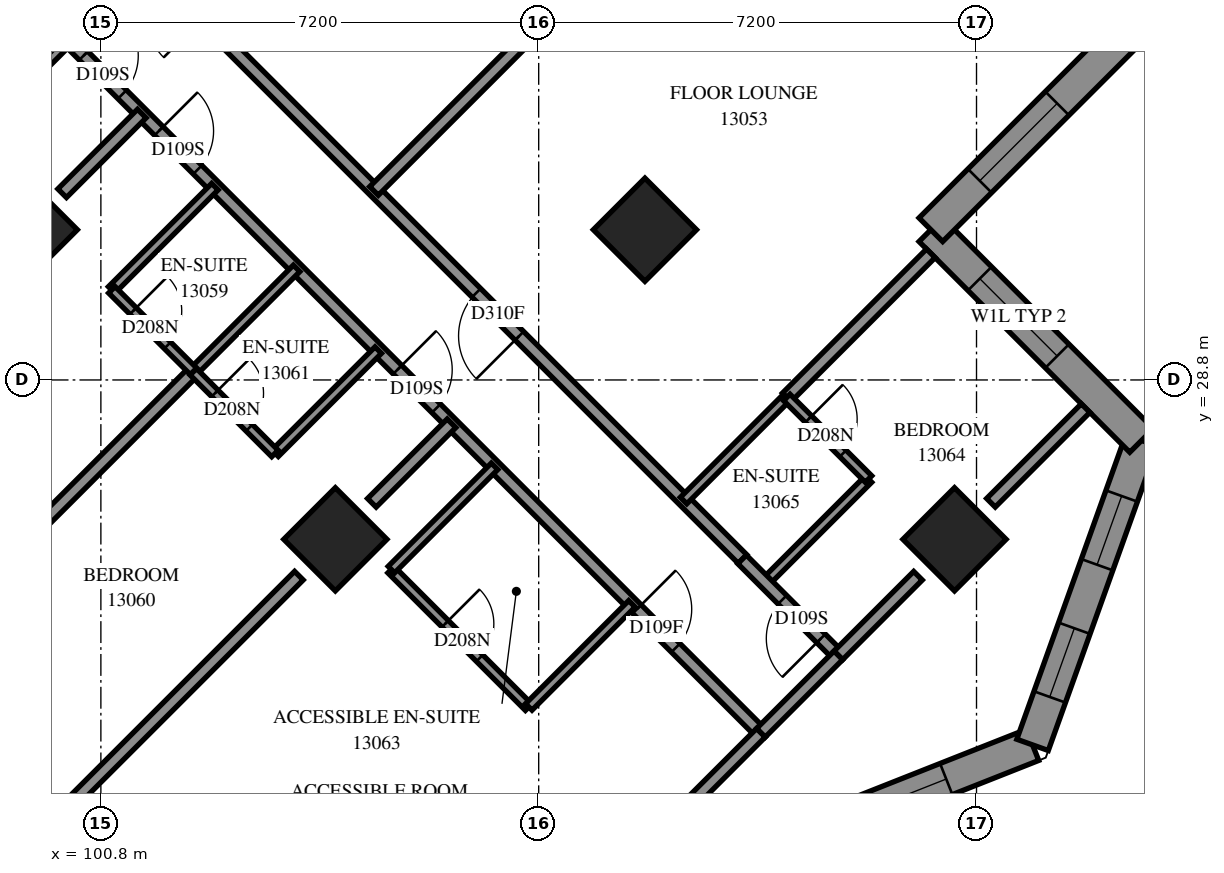
"""IFC4 building model, lengths in metres.
Left out: names, types, materials, properties, quantities, classifications, styles, units other than length and angle.
Written with IfcOpenShell. Run it as: python <this file> out.ifc"""

import sys

from ifc_helpers import new_model, si_unit, direction, frame, frame_2d, origin, origin_2d, place, context, subcontext, project, spatial, polyline, rectangle, outline, extrude, element, fill, save


model = new_model("IFC4")
c1 = context("Model", 3, precision=1e-05, world=origin(), true_north=direction((0.0, 1.0)))
c2 = subcontext(c1, "Body", "Model", "MODEL_VIEW")
j1 = project(units=[si_unit("LENGTHUNIT", "METRE"), si_unit("PLANEANGLEUNIT", "RADIAN")], contexts=[c1])
p1 = place(None, origin())
s1 = spatial("IfcSite", under=j1, at=p1, CompositionType="ELEMENT")
p2 = place(p1, origin())
s2 = spatial("IfcBuilding", under=s1, at=p2, CompositionType="ELEMENT")
p3 = place(p2, frame((0.0, 0.0, 50.8)))
s3 = spatial("IfcBuildingStorey", under=s2, at=p3, CompositionType="ELEMENT", Elevation=50.8)
for number, where, z_axis, x_axis in (
    (1, (99.565, 31.271, 0.0), (0.0, 0.0, 1.0), (0.707, -0.707, 0.0)),
    (2, (109.747, 31.271, 0.0), (0.0, 0.0, 1.0), (0.707, -0.707, 0.0)),
    (3, (104.656, 26.18, 0.0), (0.0, 0.0, 1.0), (0.707, -0.707, 0.0)),
    (4, (114.838, 26.18, 0.0), (0.0, 0.0, 1.0), (0.707, -0.707, 0.0)),
):
    element("IfcColumn", number, at=place(p3, frame(where, z_axis=z_axis, x_axis=x_axis)), inside=s3, PredefinedType="COLUMN", context=c2, shape_type="SweptSolid", body=[
        extrude(rectangle(XDim=1.2, YDim=1.2, at=origin_2d()), origin(), (0.0, 0.0, 1.0), 3.1),
    ])
p4 = place(p3, frame((110.98, 20.766, 0.0), z_axis=(0.0, 0.0, 1.0), x_axis=(0.9299302272, 0.3677360094, 0.0)))
e5 = element("IfcWall", 5, at=p4, inside=s3, PredefinedType="SOLIDWALL", context=c2, shape_type="SweptSolid", body=[
    extrude(outline(polyline([(0.119, -0.275), (5.653, -0.275), (5.404, 0.275), (-0.119, 0.275), (0.119, -0.275)])), origin(), (0.0, 0.0, 1.0), 3.1),
])
p5 = place(p4, frame((1.202, 0.0, 0.5)))
e6 = element("IfcOpeningElement", 6, at=p5, cuts=e5, PredefinedType="OPENING", context=c2, shape_type="SweptSolid", body=[
    extrude(rectangle(XDim=2.8, YDim=2.45, at=frame_2d((1.4, 1.225))), frame((0.0, 0.285, 0.0), z_axis=(0.0, -1.0, 0.0), x_axis=(1.0, 0.0, 0.0)), (0.0, 0.0, 1.0), 0.57),
])
p6 = place(p3, frame((116.122, 22.799, 0.0), z_axis=(0.0, 0.0, 1.0), x_axis=(0.3371641743, 0.9414458665, 0.0)))
e7 = element("IfcWall", 7, at=p6, inside=s3, PredefinedType="SOLIDWALL", context=c2, shape_type="SweptSolid", body=[
    extrude(outline(polyline([(-0.124, -0.275), (5.492, -0.275), (5.144, 0.275), (0.124, 0.275), (-0.124, -0.275)])), origin(), (0.0, 0.0, 1.0), 3.1),
])
p7 = place(p6, frame((0.838, 0.0, 0.5)))
e8 = element("IfcOpeningElement", 8, at=p7, cuts=e7, PredefinedType="OPENING", context=c2, shape_type="SweptSolid", body=[
    extrude(rectangle(XDim=1.2, YDim=2.45, at=frame_2d((0.6, 1.225))), frame((0.0, 0.285, 0.0), z_axis=(0.0, -1.0, 0.0), x_axis=(1.0, 0.0, 0.0)), (0.0, 0.0, 1.0), 0.57),
])
p8 = place(p6, frame((3.147, 0.0, 0.5)))
e9 = element("IfcOpeningElement", 9, at=p8, cuts=e7, PredefinedType="OPENING", context=c2, shape_type="SweptSolid", body=[
    extrude(rectangle(XDim=1.2, YDim=2.45, at=frame_2d((0.6, 1.225))), frame((0.0, 0.285, 0.0), z_axis=(0.0, -1.0, 0.0), x_axis=(1.0, 0.0, 0.0)), (0.0, 0.0, 1.0), 0.57),
])
p9 = place(p3, frame((117.915, 27.805, 0.0), z_axis=(0.0, 0.0, 1.0), x_axis=(-0.7071067812, 0.7071067812, 0.0)))
e10 = element("IfcWall", 10, at=p9, inside=s3, PredefinedType="SOLIDWALL", context=c2, shape_type="SweptSolid", body=[
    extrude(outline(polyline([(-0.174, -0.275), (4.626, -0.275), (5.176, 0.275), (0.174, 0.275), (-0.174, -0.275)])), origin(), (0.0, 0.0, 1.0), 3.1),
])
p10 = place(p9, frame((1.963, 0.0, 0.6)))
e11 = element("IfcOpeningElement", 11, at=p10, cuts=e10, PredefinedType="OPENING", context=c2, shape_type="SweptSolid", body=[
    extrude(rectangle(XDim=1.8, YDim=1.9, at=frame_2d((0.9, 0.95))), frame((0.0, 0.285, 0.0), z_axis=(0.0, -1.0, 0.0), x_axis=(1.0, 0.0, 0.0)), (0.0, 0.0, 1.0), 0.57),
])
p11 = place(p3, frame((114.449, 31.271, 0.0), z_axis=(0.0, 0.0, 1.0), x_axis=(0.7070981737, 0.7071153885, 0.0)))
e12 = element("IfcWall", 12, at=p11, inside=s3, PredefinedType="SOLIDWALL", context=c2, shape_type="SweptSolid", body=[
    extrude(outline(polyline([(0.275, -0.275), (6.187, -0.275), (5.431, 0.275), (-0.275, 0.275), (0.275, -0.275)])), origin(), (0.0, 0.0, 1.0), 3.1),
])
p12 = place(p11, frame((1.137, 0.0, 0.6)))
e13 = element("IfcOpeningElement", 13, at=p12, cuts=e12, PredefinedType="OPENING", context=c2, shape_type="SweptSolid", body=[
    extrude(rectangle(XDim=1.8, YDim=1.9, at=frame_2d((0.9, 0.95))), frame((0.0, 0.285, 0.0), z_axis=(0.0, -1.0, 0.0), x_axis=(1.0, 0.0, 0.0)), (0.0, 0.0, 1.0), 0.57),
])
p13 = place(p3, frame((93.481, 41.167, 0.0), z_axis=(0.0, 0.0, 1.0), x_axis=(0.7071067812, -0.7071067812, 0.0)))
e14 = element("IfcWall", 14, at=p13, inside=s3, PredefinedType="PARTITIONING", context=c2, shape_type="SweptSolid", body=[
    extrude(rectangle(XDim=25.699, YDim=0.2, at=frame_2d((12.85, 0.0))), origin(), (0.0, 0.0, 1.0), 3.1),
])
p14 = place(p13, frame((2.8, 0.0, 0.0)))
e15 = element("IfcOpeningElement", 15, at=p14, cuts=e14, PredefinedType="OPENING", context=c2, shape_type="SweptSolid", body=[
    extrude(rectangle(XDim=0.9, YDim=2.1, at=frame_2d((0.45, 1.05))), frame((0.0, 0.11, 0.0), z_axis=(0.0, -1.0, 0.0), x_axis=(1.0, 0.0, 0.0)), (0.0, 0.0, 1.0), 0.22),
])
p15 = place(p13, frame((9.948, 0.0, 0.0)))
e16 = element("IfcOpeningElement", 16, at=p15, cuts=e14, PredefinedType="OPENING", context=c2, shape_type="SweptSolid", body=[
    extrude(rectangle(XDim=0.9, YDim=2.1, at=frame_2d((0.45, 1.05))), frame((0.0, 0.11, 0.0), z_axis=(0.0, -1.0, 0.0), x_axis=(1.0, 0.0, 0.0)), (0.0, 0.0, 1.0), 0.22),
])
p16 = place(p13, frame((11.7, 0.0, 0.0)))
e17 = element("IfcOpeningElement", 17, at=p16, cuts=e14, PredefinedType="OPENING", context=c2, shape_type="SweptSolid", body=[
    extrude(rectangle(XDim=0.9, YDim=2.1, at=frame_2d((0.45, 1.05))), frame((0.0, 0.11, 0.0), z_axis=(0.0, -1.0, 0.0), x_axis=(1.0, 0.0, 0.0)), (0.0, 0.0, 1.0), 0.22),
])
p17 = place(p13, frame((17.25, 0.0, 0.0)))
e18 = element("IfcOpeningElement", 18, at=p17, cuts=e14, PredefinedType="OPENING", context=c2, shape_type="SweptSolid", body=[
    extrude(rectangle(XDim=0.9, YDim=2.1, at=frame_2d((0.45, 1.05))), frame((0.0, 0.11, 0.0), z_axis=(0.0, -1.0, 0.0), x_axis=(1.0, 0.0, 0.0)), (0.0, 0.0, 1.0), 0.22),
])
p18 = place(p13, frame((22.82, 0.0, 0.0)))
e19 = element("IfcOpeningElement", 19, at=p18, cuts=e14, PredefinedType="OPENING", context=c2, shape_type="SweptSolid", body=[
    extrude(rectangle(XDim=0.9, YDim=2.1, at=frame_2d((0.45, 1.05))), frame((0.0, 0.11, 0.0), z_axis=(0.0, -1.0, 0.0), x_axis=(1.0, 0.0, 0.0)), (0.0, 0.0, 1.0), 0.22),
])
p19 = place(p3, frame((111.352, 25.855, 0.0), z_axis=(0.0, 0.0, 1.0), x_axis=(-0.7070418597, 0.7071716967, 0.0)))
e20 = element("IfcWall", 20, at=p19, inside=s3, PredefinedType="PARTITIONING", context=c2, shape_type="SweptSolid", body=[
    extrude(rectangle(XDim=13.864, YDim=0.2, at=frame_2d((6.932, 0.0))), origin(), (0.0, 0.0, 1.0), 3.1),
])
p20 = place(p19, frame((12.564, 0.0, 0.0)))
e21 = element("IfcOpeningElement", 21, at=p20, cuts=e20, PredefinedType="OPENING", context=c2, shape_type="SweptSolid", body=[
    extrude(rectangle(XDim=0.9, YDim=2.1, at=frame_2d((0.45, 1.05))), frame((0.0, 0.11, 0.0), z_axis=(0.0, -1.0, 0.0), x_axis=(1.0, 0.0, 0.0)), (0.0, 0.0, 1.0), 0.22),
])
p21 = place(p19, frame((5.19, 0.0, 0.0)))
e22 = element("IfcOpeningElement", 22, at=p21, cuts=e20, PredefinedType="OPENING", context=c2, shape_type="SweptSolid", body=[
    extrude(rectangle(XDim=1.0, YDim=2.1, at=frame_2d((0.5, 1.05))), frame((0.0, 0.11, 0.0), z_axis=(0.0, -1.0, 0.0), x_axis=(1.0, 0.0, 0.0)), (0.0, 0.0, 1.0), 0.22),
])
p22 = place(p3, frame((105.292, 31.908, 0.0), z_axis=(0.0, 0.0, 1.0), x_axis=(0.7071022382, 0.7071113241, 0.0)))
e23 = element("IfcWall", 23, at=p22, inside=s3, PredefinedType="PARTITIONING", context=c2, shape_type="SweptSolid", body=[
    extrude(rectangle(XDim=11.006, YDim=0.2, at=frame_2d((5.503, 0.0))), origin(), (0.0, 0.0, 1.0), 3.1),
])
p23 = place(p3, frame((96.526, 23.142, 0.0), z_axis=(0.0, 0.0, 1.0), x_axis=(0.7071128801, 0.7071006822, 0.0)))
e24 = element("IfcWall", 24, at=p23, inside=s3, PredefinedType="PARTITIONING", context=c2, shape_type="SweptSolid", body=[
    extrude(rectangle(XDim=8.198, YDim=0.2, at=frame_2d((4.099, 0.0))), origin(), (0.0, 0.0, 1.0), 3.1),
])
p24 = place(p3, frame((100.162, 21.688, 0.0), z_axis=(0.0, 0.0, 1.0), x_axis=(0.7071067812, 0.7071067812, 0.0)))
e25 = element("IfcWall", 25, at=p24, inside=s3, PredefinedType="PARTITIONING", context=c2, shape_type="SweptSolid", body=[
    extrude(rectangle(XDim=5.507, YDim=0.2, at=frame_2d((2.753, 0.0))), origin(), (0.0, 0.0, 1.0), 3.1),
])
p25 = place(p3, frame((112.079, 28.513, 0.0), z_axis=(0.0, 0.0, 1.0), x_axis=(0.7071067812, 0.7071067812, 0.0)))
e26 = element("IfcWall", 26, at=p25, inside=s3, PredefinedType="PARTITIONING", context=c2, shape_type="SweptSolid", body=[
    extrude(rectangle(XDim=3.351, YDim=0.2, at=frame_2d((1.675, 0.0))), origin(), (0.0, 0.0, 1.0), 3.1),
])
p26 = place(p3, frame((105.573, 25.681, 0.0), z_axis=(0.0, 0.0, 1.0), x_axis=(0.7071067812, -0.7071067812, 0.0)))
e27 = element("IfcWall", 27, at=p26, inside=s3, PredefinedType="PARTITIONING", context=c2, shape_type="SweptSolid", body=[
    extrude(rectangle(XDim=3.199, YDim=0.15, at=frame_2d((1.599, 0.0))), origin(), (0.0, 0.0, 1.0), 3.1),
])
p27 = place(p26, frame((1.258, 0.0, 0.0)))
e28 = element("IfcOpeningElement", 28, at=p27, cuts=e27, PredefinedType="OPENING", context=c2, shape_type="SweptSolid", body=[
    extrude(rectangle(XDim=0.8, YDim=2.1, at=frame_2d((0.4, 1.05))), frame((0.0, 0.085, 0.0), z_axis=(0.0, -1.0, 0.0), x_axis=(1.0, 0.0, 0.0)), (0.0, 0.0, 1.0), 0.17),
])
for number, where, z_axis, x_axis in (
    (29, (100.977, 30.281, 0.0), (0.0, 0.0, 1.0), (0.707, 0.707, 0.0)),
    (30, (111.725, 25.473, 0.0), (0.0, 0.0, 1.0), (0.707, 0.707, 0.0)),
    (31, (98.573, 32.685, 0.0), (0.0, 0.0, 1.0), (0.707, 0.707, 0.0)),
):
    element("IfcWall", number, at=place(p3, frame(where, z_axis=z_axis, x_axis=x_axis)), inside=s3, PredefinedType="PARTITIONING", context=c2, shape_type="SweptSolid", body=[
        extrude(rectangle(XDim=2.401, YDim=0.15, at=frame_2d((1.201, 0.0))), origin(), (0.0, 0.0, 1.0), 3.1),
    ])
p28 = place(p3, frame((105.578, 25.682, 0.0), z_axis=(0.0, 0.0, 1.0), x_axis=(0.706689978, 0.7075233388, 0.0)))
e32 = element("IfcWall", 32, at=p28, inside=s3, PredefinedType="PARTITIONING", context=c2, shape_type="SweptSolid", body=[
    extrude(rectangle(XDim=2.4, YDim=0.15, at=frame_2d((1.2, 0.0))), origin(), (0.0, 0.0, 1.0), 3.1),
])
for number, where, z_axis, x_axis in (
    (33, (110.383, 26.817, 0.0), (0.0, 0.0, 1.0), (0.707, 0.707, 0.0)),
    (34, (102.323, 28.939, 0.0), (0.0, 0.0, 1.0), (0.707, 0.707, 0.0)),
    (35, (103.665, 27.595, 0.0), (0.0, 0.0, 1.0), (0.707, 0.707, 0.0)),
    (36, (107.837, 23.423, 0.0), (0.0, 0.0, 1.0), (0.707, 0.707, 0.0)),
):
    element("IfcWall", number, at=place(p3, frame(where, z_axis=z_axis, x_axis=x_axis)), inside=s3, PredefinedType="PARTITIONING", context=c2, shape_type="SweptSolid", body=[
        extrude(rectangle(XDim=2.398, YDim=0.15, at=frame_2d((1.199, 0.0))), origin(), (0.0, 0.0, 1.0), 3.1),
    ])
p29 = place(p3, frame((112.925, 24.267, 0.0), z_axis=(0.0, 0.0, 1.0), x_axis=(-0.7068383786, 0.707375082, 0.0)))
e37 = element("IfcWall", 37, at=p29, inside=s3, PredefinedType="PARTITIONING", context=c2, shape_type="SweptSolid", body=[
    extrude(rectangle(XDim=2.236, YDim=0.2, at=frame_2d((1.118, 0.0))), origin(), (0.0, 0.0, 1.0), 3.1),
])
p30 = place(p29, frame((0.4, 0.0, 0.0)))
e38 = element("IfcOpeningElement", 38, at=p30, cuts=e37, PredefinedType="OPENING", context=c2, shape_type="SweptSolid", body=[
    extrude(rectangle(XDim=0.9, YDim=2.1, at=frame_2d((0.45, 1.05))), frame((0.0, 0.11, 0.0), z_axis=(0.0, -1.0, 0.0), x_axis=(1.0, 0.0, 0.0)), (0.0, 0.0, 1.0), 0.22),
])
p31 = place(p3, frame((115.438, 26.78, 0.0), z_axis=(0.0, 0.0, 1.0), x_axis=(0.7071067812, 0.7071067812, 0.0)))
e39 = element("IfcWall", 39, at=p31, inside=s3, PredefinedType="PARTITIONING", context=c2, shape_type="SweptSolid", body=[
    extrude(rectangle(XDim=2.201, YDim=0.2, at=frame_2d((1.101, 0.0))), origin(), (0.0, 0.0, 1.0), 3.1),
])
p32 = place(p3, frame((100.981, 30.283, 0.0), z_axis=(0.0, 0.0, 1.0), x_axis=(0.7076330979, -0.7065800724, 0.0)))
e40 = element("IfcWall", 40, at=p32, inside=s3, PredefinedType="PARTITIONING", context=c2, shape_type="SweptSolid", body=[
    extrude(rectangle(XDim=1.899, YDim=0.15, at=frame_2d((0.95, 0.0))), origin(), (0.0, 0.0, 1.0), 3.1),
])
p33 = place(p32, frame((0.493, 0.0, 0.0)))
e41 = element("IfcOpeningElement", 41, at=p33, cuts=e40, PredefinedType="OPENING", context=c2, shape_type="SweptSolid", body=[
    extrude(rectangle(XDim=0.8, YDim=2.1, at=frame_2d((0.4, 1.05))), frame((0.0, 0.085, 0.0), z_axis=(0.0, -1.0, 0.0), x_axis=(1.0, 0.0, 0.0)), (0.0, 0.0, 1.0), 0.17),
])
p34 = place(p3, frame((102.321, 28.935, 0.0), z_axis=(0.0, 0.0, 1.0), x_axis=(0.7065800724, -0.7076330979, 0.0)))
e42 = element("IfcWall", 42, at=p34, inside=s3, PredefinedType="PARTITIONING", context=c2, shape_type="SweptSolid", body=[
    extrude(rectangle(XDim=1.899, YDim=0.15, at=frame_2d((0.95, 0.0))), origin(), (0.0, 0.0, 1.0), 3.1),
])
p35 = place(p34, frame((0.501, 0.0, 0.0)))
e43 = element("IfcOpeningElement", 43, at=p35, cuts=e42, PredefinedType="OPENING", context=c2, shape_type="SweptSolid", body=[
    extrude(rectangle(XDim=0.8, YDim=2.1, at=frame_2d((0.4, 1.05))), frame((0.0, 0.085, 0.0), z_axis=(0.0, -1.0, 0.0), x_axis=(1.0, 0.0, 0.0)), (0.0, 0.0, 1.0), 0.17),
])
p36 = place(p3, frame((112.08, 28.512, 0.0), z_axis=(0.0, 0.0, 1.0), x_axis=(0.7076330979, -0.7065800724, 0.0)))
e44 = element("IfcWall", 44, at=p36, inside=s3, PredefinedType="PARTITIONING", context=c2, shape_type="SweptSolid", body=[
    extrude(rectangle(XDim=1.899, YDim=0.15, at=frame_2d((0.95, 0.0))), origin(), (0.0, 0.0, 1.0), 3.1),
])
p37 = place(p36, frame((0.505, 0.0, 0.0)))
e45 = element("IfcOpeningElement", 45, at=p37, cuts=e44, PredefinedType="OPENING", context=c2, shape_type="SweptSolid", body=[
    extrude(rectangle(XDim=0.8, YDim=2.1, at=frame_2d((0.4, 1.05))), frame((0.0, 0.085, 0.0), z_axis=(0.0, -1.0, 0.0), x_axis=(1.0, 0.0, 0.0)), (0.0, 0.0, 1.0), 0.17),
])
p38 = place(p3, frame((110.346, 21.689, 0.0), z_axis=(0.0, 0.0, 1.0), x_axis=(0.7071067812, 0.7071067812, 0.0)))
e46 = element("IfcWall", 46, at=p38, inside=s3, PredefinedType="PARTITIONING", context=c2, shape_type="SweptSolid", body=[
    extrude(rectangle(XDim=1.853, YDim=0.2, at=frame_2d((0.926, 0.0))), origin(), (0.0, 0.0, 1.0), 2.6),
])
p39 = place(p3, frame((100.163, 31.871, 0.0), z_axis=(0.0, 0.0, 1.0), x_axis=(0.7071067812, 0.7071067812, 0.0)))
e47 = element("IfcWall", 47, at=p39, inside=s3, PredefinedType="PARTITIONING", context=c2, shape_type="SweptSolid", body=[
    extrude(rectangle(XDim=1.853, YDim=0.2, at=frame_2d((0.926, 0.0))), origin(), (0.0, 0.0, 1.0), 3.1),
])
p40 = place(p3, frame((112.927, 24.27, 0.0), z_axis=(0.0, 0.0, 1.0), x_axis=(0.7071067812, 0.7071067812, 0.0)))
e48 = element("IfcWall", 48, at=p40, inside=s3, PredefinedType="PARTITIONING", context=c2, shape_type="SweptSolid", body=[
    extrude(rectangle(XDim=1.853, YDim=0.2, at=frame_2d((0.926, 0.0))), origin(), (0.0, 0.0, 1.0), 2.6),
])
p41 = place(p3, frame((105.256, 26.78, 0.0), z_axis=(0.0, 0.0, 1.0), x_axis=(0.7076467632, 0.7065663865, 0.0)))
e49 = element("IfcWall", 49, at=p41, inside=s3, PredefinedType="PARTITIONING", context=c2, shape_type="SweptSolid", body=[
    extrude(rectangle(XDim=1.851, YDim=0.2, at=frame_2d((0.926, 0.0))), origin(), (0.0, 0.0, 1.0), 3.1),
])
p42 = place(p3, frame((111.656, 22.998, 0.0), z_axis=(0.0, 0.0, 1.0), x_axis=(0.7071067812, 0.7071067812, 0.0)))
e50 = element("IfcWall", 50, at=p42, inside=s3, PredefinedType="PARTITIONING", context=c2, shape_type="SweptSolid", body=[
    extrude(rectangle(XDim=1.799, YDim=0.2, at=frame_2d((0.899, 0.0))), origin(), (0.0, 0.0, 1.0), 2.6),
])
p43 = place(p5, origin())
e51 = element("IfcWindow", 51, at=p43, inside=s3, PartitioningType="SINGLE_PANEL", PredefinedType="WINDOW", context=c2, shape_type="SweptSolid", body=[
    extrude(rectangle(XDim=2.8, YDim=2.45, at=frame_2d((1.4, 1.225))), frame((0.0, 0.155, 0.0), z_axis=(0.0, -1.0, 0.0), x_axis=(1.0, 0.0, 0.0)), (0.0, 0.0, 1.0), 0.06),
])
fill(e6, e51)
p44 = place(p7, origin())
e52 = element("IfcWindow", 52, at=p44, inside=s3, PartitioningType="SINGLE_PANEL", PredefinedType="WINDOW", context=c2, shape_type="SweptSolid", body=[
    extrude(rectangle(XDim=1.2, YDim=2.45, at=frame_2d((0.6, 1.225))), frame((0.0, 0.155, 0.0), z_axis=(0.0, -1.0, 0.0), x_axis=(1.0, 0.0, 0.0)), (0.0, 0.0, 1.0), 0.06),
])
fill(e8, e52)
p45 = place(p8, origin())
e53 = element("IfcWindow", 53, at=p45, inside=s3, PartitioningType="SINGLE_PANEL", PredefinedType="WINDOW", context=c2, shape_type="SweptSolid", body=[
    extrude(rectangle(XDim=1.2, YDim=2.45, at=frame_2d((0.6, 1.225))), frame((0.0, 0.155, 0.0), z_axis=(0.0, -1.0, 0.0), x_axis=(1.0, 0.0, 0.0)), (0.0, 0.0, 1.0), 0.06),
])
fill(e9, e53)
p46 = place(p10, origin())
e54 = element("IfcWindow", 54, at=p46, inside=s3, PartitioningType="SINGLE_PANEL", PredefinedType="WINDOW", context=c2, shape_type="SweptSolid", body=[
    extrude(rectangle(XDim=1.8, YDim=1.9, at=frame_2d((0.9, 0.95))), frame((0.0, 0.155, 0.0), z_axis=(0.0, -1.0, 0.0), x_axis=(1.0, 0.0, 0.0)), (0.0, 0.0, 1.0), 0.06),
])
fill(e11, e54)
p47 = place(p12, origin())
e55 = element("IfcWindow", 55, at=p47, inside=s3, PartitioningType="SINGLE_PANEL", PredefinedType="WINDOW", context=c2, shape_type="SweptSolid", body=[
    extrude(rectangle(XDim=1.8, YDim=1.9, at=frame_2d((0.9, 0.95))), frame((0.0, 0.155, 0.0), z_axis=(0.0, -1.0, 0.0), x_axis=(1.0, 0.0, 0.0)), (0.0, 0.0, 1.0), 0.06),
])
fill(e13, e55)
p48 = place(p21, origin())
e56 = element("IfcDoor", 56, at=p48, inside=s3, OperationType="SINGLE_SWING_RIGHT", PredefinedType="DOOR", context=c2, shape_type="SweptSolid", body=[
    extrude(rectangle(XDim=1.0, YDim=2.1, at=frame_2d((0.5, 1.05))), frame((0.0, 0.025, 0.0), z_axis=(0.0, -1.0, 0.0), x_axis=(1.0, 0.0, 0.0)), (0.0, 0.0, 1.0), 0.05),
])
fill(e22, e56)
p49 = place(p15, origin())
e57 = element("IfcDoor", 57, at=p49, inside=s3, OperationType="SINGLE_SWING_LEFT", PredefinedType="DOOR", context=c2, shape_type="SweptSolid", body=[
    extrude(rectangle(XDim=0.9, YDim=2.1, at=frame_2d((0.45, 1.05))), frame((0.0, 0.025, 0.0), z_axis=(0.0, -1.0, 0.0), x_axis=(1.0, 0.0, 0.0)), (0.0, 0.0, 1.0), 0.05),
])
fill(e16, e57)
p50 = place(p16, origin())
e58 = element("IfcDoor", 58, at=p50, inside=s3, OperationType="SINGLE_SWING_RIGHT", PredefinedType="DOOR", context=c2, shape_type="SweptSolid", body=[
    extrude(rectangle(XDim=0.9, YDim=2.1, at=frame_2d((0.45, 1.05))), frame((0.0, 0.025, 0.0), z_axis=(0.0, -1.0, 0.0), x_axis=(1.0, 0.0, 0.0)), (0.0, 0.0, 1.0), 0.05),
])
fill(e17, e58)
p51 = place(p33, origin())
e59 = element("IfcDoor", 59, at=p51, inside=s3, OperationType="SINGLE_SWING_RIGHT", PredefinedType="DOOR", context=c2, shape_type="SweptSolid", body=[
    extrude(rectangle(XDim=0.8, YDim=2.1, at=frame_2d((0.4, 1.05))), frame((0.0, 0.025, 0.0), z_axis=(0.0, -1.0, 0.0), x_axis=(1.0, 0.0, 0.0)), (0.0, 0.0, 1.0), 0.05),
])
fill(e41, e59)
p52 = place(p17, origin())
e60 = element("IfcDoor", 60, at=p52, inside=s3, OperationType="SINGLE_SWING_LEFT", PredefinedType="DOOR", context=c2, shape_type="SweptSolid", body=[
    extrude(rectangle(XDim=0.9, YDim=2.1, at=frame_2d((0.45, 1.05))), frame((0.0, 0.025, 0.0), z_axis=(0.0, -1.0, 0.0), x_axis=(1.0, 0.0, 0.0)), (0.0, 0.0, 1.0), 0.05),
])
fill(e18, e60)
p53 = place(p35, origin())
e61 = element("IfcDoor", 61, at=p53, inside=s3, OperationType="SINGLE_SWING_RIGHT", PredefinedType="DOOR", context=c2, shape_type="SweptSolid", body=[
    extrude(rectangle(XDim=0.8, YDim=2.1, at=frame_2d((0.4, 1.05))), frame((0.0, 0.025, 0.0), z_axis=(0.0, -1.0, 0.0), x_axis=(1.0, 0.0, 0.0)), (0.0, 0.0, 1.0), 0.05),
])
fill(e43, e61)
p54 = place(p18, origin())
e62 = element("IfcDoor", 62, at=p54, inside=s3, OperationType="SINGLE_SWING_RIGHT", PredefinedType="DOOR", context=c2, shape_type="SweptSolid", body=[
    extrude(rectangle(XDim=0.9, YDim=2.1, at=frame_2d((0.45, 1.05))), frame((0.0, 0.025, 0.0), z_axis=(0.0, -1.0, 0.0), x_axis=(1.0, 0.0, 0.0)), (0.0, 0.0, 1.0), 0.05),
])
fill(e19, e62)
p55 = place(p27, origin())
e63 = element("IfcDoor", 63, at=p55, inside=s3, OperationType="SINGLE_SWING_RIGHT", PredefinedType="DOOR", context=c2, shape_type="SweptSolid", body=[
    extrude(rectangle(XDim=0.8, YDim=2.1, at=frame_2d((0.4, 1.05))), frame((0.0, 0.025, 0.0), z_axis=(0.0, -1.0, 0.0), x_axis=(1.0, 0.0, 0.0)), (0.0, 0.0, 1.0), 0.05),
])
fill(e28, e63)
p56 = place(p30, origin())
e64 = element("IfcDoor", 64, at=p56, inside=s3, OperationType="SINGLE_SWING_RIGHT", PredefinedType="DOOR", context=c2, shape_type="SweptSolid", body=[
    extrude(rectangle(XDim=0.9, YDim=2.1, at=frame_2d((0.45, 1.05))), frame((0.0, 0.025, 0.0), z_axis=(0.0, -1.0, 0.0), x_axis=(1.0, 0.0, 0.0)), (0.0, 0.0, 1.0), 0.05),
])
fill(e38, e64)
p57 = place(p37, origin())
e65 = element("IfcDoor", 65, at=p57, inside=s3, OperationType="SINGLE_SWING_RIGHT", PredefinedType="DOOR", context=c2, shape_type="SweptSolid", body=[
    extrude(rectangle(XDim=0.8, YDim=2.1, at=frame_2d((0.4, 1.05))), frame((0.0, 0.025, 0.0), z_axis=(0.0, -1.0, 0.0), x_axis=(1.0, 0.0, 0.0)), (0.0, 0.0, 1.0), 0.05),
])
fill(e45, e65)
save(model, sys.argv[1])
